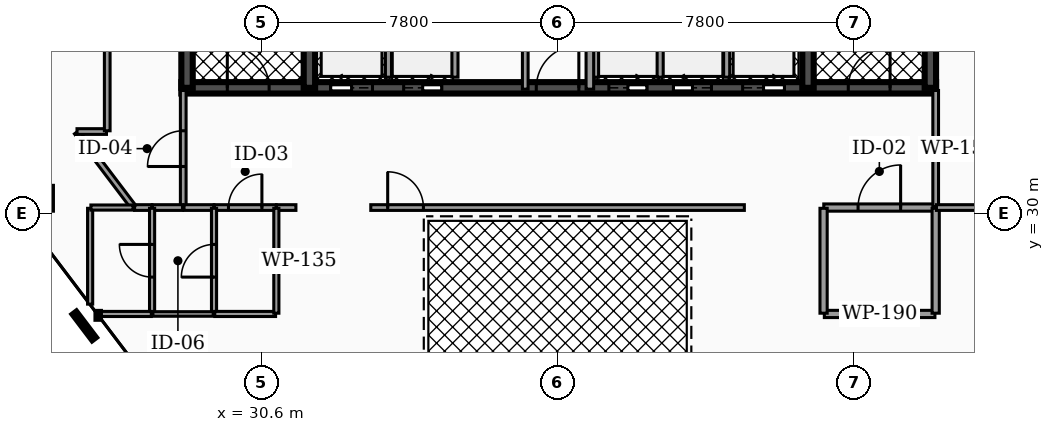
"""IFC4 building model, lengths in metres.
Left out: names, types, materials, properties, quantities, classifications, styles, units other than length and angle.
Written with IfcOpenShell. Run it as: python <this file> out.ifc"""

import sys

from ifc_helpers import new_model, si_unit, direction, frame, frame_2d, origin, place, context, subcontext, project, spatial, rectangle, extrude, element, fill, save


model = new_model("IFC4")
c1 = context("Model", 3, precision=1e-05, world=origin(), true_north=direction((0.0, 1.0)))
c2 = subcontext(c1, "Body", "Model", "MODEL_VIEW")
j1 = project(units=[si_unit("LENGTHUNIT", "METRE"), si_unit("PLANEANGLEUNIT", "RADIAN")], contexts=[c1])
p1 = place(None, origin())
s1 = spatial("IfcSite", under=j1, at=p1, CompositionType="ELEMENT")
p2 = place(p1, origin())
s2 = spatial("IfcBuilding", under=s1, at=p2, CompositionType="ELEMENT")
p3 = place(p2, frame((0.0, 0.0, 239.36)))
s3 = spatial("IfcBuildingStorey", under=s2, at=p3, CompositionType="ELEMENT", Elevation=239.36)
p4 = place(p3, frame((28.5, 33.3, 0.0), z_axis=(0.0, 0.0, 1.0), x_axis=(1.0, 0.0, 0.0)))
e1 = element("IfcWall", 1, at=p4, inside=s3, PredefinedType="SHEAR", context=c2, shape_type="SweptSolid", body=[
    extrude(rectangle(XDim=19.86, YDim=0.3, at=frame_2d((9.93, 0.0))), origin(), (0.0, 0.0, 1.0), 3.18),
])
p5 = place(p4, frame((3.93, 0.0, 0.0)))
e2 = element("IfcOpeningElement", 2, at=p5, cuts=e1, PredefinedType="OPENING", context=c2, shape_type="SweptSolid", body=[
    extrude(rectangle(XDim=1.1, YDim=2.15, at=frame_2d((0.55, 1.075))), frame((0.0, 0.16, 0.0), z_axis=(0.0, -1.0, 0.0), x_axis=(1.0, 0.0, 0.0)), (0.0, 0.0, 1.0), 0.32),
])
p6 = place(p4, frame((14.77, 0.0, 0.0)))
e3 = element("IfcOpeningElement", 3, at=p6, cuts=e1, PredefinedType="OPENING", context=c2, shape_type="SweptSolid", body=[
    extrude(rectangle(XDim=1.1, YDim=2.15, at=frame_2d((0.55, 1.075))), frame((0.0, 0.16, 0.0), z_axis=(0.0, -1.0, 0.0), x_axis=(1.0, 0.0, 0.0)), (0.0, 0.0, 1.0), 0.32),
])
p7 = place(p4, frame((11.25, 0.0, 0.0)))
e4 = element("IfcOpeningElement", 4, at=p7, cuts=e1, PredefinedType="OPENING", context=c2, shape_type="SweptSolid", body=[
    extrude(rectangle(XDim=1.0, YDim=2.1, at=frame_2d((0.5, 1.05))), frame((0.0, 0.16, 0.0), z_axis=(0.0, -1.0, 0.0), x_axis=(1.0, 0.0, 0.0)), (0.0, 0.0, 1.0), 0.32),
])
p8 = place(p4, frame((12.95, 0.0, 0.0)))
e5 = element("IfcOpeningElement", 5, at=p8, cuts=e1, PredefinedType="OPENING", context=c2, shape_type="SweptSolid", body=[
    extrude(rectangle(XDim=1.0, YDim=2.1, at=frame_2d((0.5, 1.05))), frame((0.0, 0.16, 0.0), z_axis=(0.0, -1.0, 0.0), x_axis=(1.0, 0.0, 0.0)), (0.0, 0.0, 1.0), 0.32),
])
p9 = place(p4, frame((5.85, 0.0, 0.0)))
e6 = element("IfcOpeningElement", 6, at=p9, cuts=e1, PredefinedType="OPENING", context=c2, shape_type="SweptSolid", body=[
    extrude(rectangle(XDim=1.0, YDim=2.1, at=frame_2d((0.5, 1.05))), frame((0.0, 0.16, 0.0), z_axis=(0.0, -1.0, 0.0), x_axis=(1.0, 0.0, 0.0)), (0.0, 0.0, 1.0), 0.32),
])
p10 = place(p4, frame((1.21, 0.0, 0.0)))
e7 = element("IfcOpeningElement", 7, at=p10, cuts=e1, PredefinedType="OPENING", context=c2, shape_type="SweptSolid", body=[
    extrude(rectangle(XDim=1.1, YDim=2.2, at=frame_2d((0.55, 1.1))), frame((0.0, 0.16, 0.0), z_axis=(0.0, -1.0, 0.0), x_axis=(1.0, 0.0, 0.0)), (0.0, 0.0, 1.0), 0.32),
])
p11 = place(p4, frame((9.34, 0.0, 0.0)))
e8 = element("IfcOpeningElement", 8, at=p11, cuts=e1, PredefinedType="OPENING", context=c2, shape_type="SweptSolid", body=[
    extrude(rectangle(XDim=1.12, YDim=2.05, at=frame_2d((0.56, 1.025))), frame((0.0, 0.16, 0.0), z_axis=(0.0, -1.0, 0.0), x_axis=(1.0, 0.0, 0.0)), (0.0, 0.0, 1.0), 0.32),
])
p12 = place(p4, frame((17.55, 0.0, 0.0)))
e9 = element("IfcOpeningElement", 9, at=p12, cuts=e1, PredefinedType="OPENING", context=c2, shape_type="SweptSolid", body=[
    extrude(rectangle(XDim=1.1, YDim=2.2, at=frame_2d((0.55, 1.1))), frame((0.0, 0.16, 0.0), z_axis=(0.0, -1.0, 0.0), x_axis=(1.0, 0.0, 0.0)), (0.0, 0.0, 1.0), 0.32),
])
for number, where, z_axis, x_axis in (
    (10, (28.65, 33.3, 0.0), (0.0, 0.0, 1.0), (0.0, 1.0, 0.0)),
    (11, (31.87, 33.3, 0.0), (0.0, 0.0, 1.0), (0.0, 1.0, 0.0)),
    (12, (44.99, 33.3, 0.0), (0.0, 0.0, 1.0), (0.0, 1.0, 0.0)),
    (13, (48.21, 33.3, 0.0), (0.0, 0.0, 1.0), (0.0, 1.0, 0.0)),
):
    element("IfcWall", number, at=place(p3, frame(where, z_axis=z_axis, x_axis=x_axis)), inside=s3, PredefinedType="SHEAR", context=c2, shape_type="SweptSolid", body=[
        extrude(rectangle(XDim=10.1, YDim=0.3, at=frame_2d((5.05, 0.0))), origin(), (0.0, 0.0, 1.0), 3.18),
    ])
for number, where, z_axis, x_axis in (
    (14, (33.95, 33.58, 0.0), (0.0, 0.0, 1.0), (0.0, 1.0, 0.0)),
    (15, (42.85, 33.58, 0.0), (0.0, 0.0, 1.0), (0.0, 1.0, 0.0)),
):
    element("IfcWall", number, at=place(p3, frame(where, z_axis=z_axis, x_axis=x_axis)), inside=s3, PredefinedType="SOLIDWALL", context=c2, shape_type="SweptSolid", body=[
        extrude(rectangle(XDim=2.45, YDim=0.16, at=frame_2d((1.225, 0.0))), origin(), (0.0, 0.0, 1.0), 3.18),
    ])
for number, where, z_axis, x_axis in (
    (16, (39.4, 33.58, 0.0), (0.0, 0.0, 1.0), (0.0, 1.0, 0.0)),
    (17, (41.1, 33.58, 0.0), (0.0, 0.0, 1.0), (0.0, 1.0, 0.0)),
    (18, (35.7, 33.58, 0.0), (0.0, 0.0, 1.0), (0.0, 1.0, 0.0)),
):
    element("IfcWall", number, at=place(p3, frame(where, z_axis=z_axis, x_axis=x_axis)), inside=s3, PredefinedType="SOLIDWALL", context=c2, shape_type="SweptSolid", body=[
        extrude(rectangle(XDim=2.25, YDim=0.16, at=frame_2d((1.125, 0.0))), origin(), (0.0, 0.0, 1.0), 3.18),
    ])
p13 = place(p3, frame((37.55, 33.265, 0.0), z_axis=(0.0, 0.0, 1.0), x_axis=(0.0, 1.0, 0.0)))
e19 = element("IfcWall", 19, at=p13, inside=s3, PredefinedType="PARTITIONING", context=c2, shape_type="SweptSolid", body=[
    extrude(rectangle(XDim=3.615, YDim=0.15, at=frame_2d((1.808, 0.0))), origin(), (0.0, 0.0, 1.0), 2.235),
])
p14 = place(p13, frame((1.337, 0.0, 0.0)))
e20 = element("IfcOpeningElement", 20, at=p14, cuts=e19, PredefinedType="OPENING", context=c2, shape_type="SweptSolid", body=[
    extrude(rectangle(XDim=0.94, YDim=2.05, at=frame_2d((0.47, 1.025))), frame((0.0, 0.085, 0.0), z_axis=(0.0, -1.0, 0.0), x_axis=(1.0, 0.0, 0.0)), (0.0, 0.0, 1.0), 0.17),
])
p15 = place(p3, frame((39.25, 33.265, 0.0), z_axis=(0.0, 0.0, 1.0), x_axis=(0.0, 1.0, 0.0)))
e21 = element("IfcWall", 21, at=p15, inside=s3, PredefinedType="PARTITIONING", context=c2, shape_type="SweptSolid", body=[
    extrude(rectangle(XDim=3.615, YDim=0.2, at=frame_2d((1.808, 0.0))), origin(), (0.0, 0.0, 1.0), 2.235),
])
p16 = place(p3, frame((45.405, 30.15, 0.0), z_axis=(0.0, 0.0, 1.0), x_axis=(1.0, 0.0, 0.0)))
e22 = element("IfcWall", 22, at=p16, inside=s3, PredefinedType="PARTITIONING", context=c2, shape_type="SweptSolid", body=[
    extrude(rectangle(XDim=2.925, YDim=0.19, at=frame_2d((1.462, 0.0))), origin(), (0.0, 0.0, 1.0), 2.235),
])
p17 = place(p16, frame((0.903, 0.0, 0.0)))
e23 = element("IfcOpeningElement", 23, at=p17, cuts=e22, PredefinedType="OPENING", context=c2, shape_type="SweptSolid", body=[
    extrude(rectangle(XDim=1.12, YDim=2.05, at=frame_2d((0.56, 1.025))), frame((0.0, 0.105, 0.0), z_axis=(0.0, -1.0, 0.0), x_axis=(1.0, 0.0, 0.0)), (0.0, 0.0, 1.0), 0.21),
])
p18 = place(p3, frame((28.55, 30.17, 0.0), z_axis=(0.0, 0.0, 1.0), x_axis=(0.0, 1.0, 0.0)))
e24 = element("IfcWall", 24, at=p18, inside=s3, PredefinedType="PARTITIONING", context=c2, shape_type="SweptSolid", body=[
    extrude(rectangle(XDim=3.06, YDim=0.15, at=frame_2d((1.53, 0.0))), origin(), (0.0, 0.0, 1.0), 2.235),
])
p19 = place(p18, frame((1.06, 0.0, 0.0)))
e25 = element("IfcOpeningElement", 25, at=p19, cuts=e24, PredefinedType="OPENING", context=c2, shape_type="SweptSolid", body=[
    extrude(rectangle(XDim=0.94, YDim=2.05, at=frame_2d((0.47, 1.025))), frame((0.0, 0.085, 0.0), z_axis=(0.0, -1.0, 0.0), x_axis=(1.0, 0.0, 0.0)), (0.0, 0.0, 1.0), 0.17),
])
p20 = place(p3, frame((48.35, 30.17, 0.0), z_axis=(0.0, 0.0, 1.0), x_axis=(0.0, 1.0, 0.0)))
e26 = element("IfcWall", 26, at=p20, inside=s3, PredefinedType="PARTITIONING", context=c2, shape_type="SweptSolid", body=[
    extrude(rectangle(XDim=3.06, YDim=0.15, at=frame_2d((1.53, 0.0))), origin(), (0.0, 0.0, 1.0), 2.235),
])
p21 = place(p3, frame((29.365, 30.15, 0.0), z_axis=(0.0, 0.0, 1.0), x_axis=(1.0, 0.0, 0.0)))
e27 = element("IfcWall", 27, at=p21, inside=s3, PredefinedType="PARTITIONING", context=c2, shape_type="SweptSolid", body=[
    extrude(rectangle(XDim=1.63, YDim=0.15, at=frame_2d((0.815, 0.0))), origin(), (0.0, 0.0, 1.0), 2.235),
])
p22 = place(p21, frame((0.375, 0.0, 0.0)))
e28 = element("IfcOpeningElement", 28, at=p22, cuts=e27, PredefinedType="OPENING", context=c2, shape_type="SweptSolid", body=[
    extrude(rectangle(XDim=0.88, YDim=2.05, at=frame_2d((0.44, 1.025))), frame((0.0, 0.085, 0.0), z_axis=(0.0, -1.0, 0.0), x_axis=(1.0, 0.0, 0.0)), (0.0, 0.0, 1.0), 0.17),
])
p23 = place(p3, frame((28.57, 30.15, 0.0), z_axis=(0.0, 0.0, 1.0), x_axis=(1.0, 0.0, 0.0)))
e29 = element("IfcWall", 29, at=p23, inside=s3, PredefinedType="PARTITIONING", context=c2, shape_type="SweptSolid", body=[
    extrude(rectangle(XDim=0.785, YDim=0.15, at=frame_2d((0.393, 0.0))), origin(), (0.0, 0.0, 1.0), 2.235),
])
p24 = place(p3, frame((33.485, 30.15, 0.0), z_axis=(0.0, 0.0, 1.0), x_axis=(1.0, 0.0, 0.0)))
e30 = element("IfcWall", 30, at=p24, inside=s3, PredefinedType="PARTITIONING", context=c2, shape_type="SweptSolid", body=[
    extrude(rectangle(XDim=9.83, YDim=0.15, at=frame_2d((4.915, 0.0))), origin(), (0.0, 0.0, 1.0), 2.235),
])
p25 = place(p24, frame((0.445, 0.0, 0.0)))
e31 = element("IfcOpeningElement", 31, at=p25, cuts=e30, PredefinedType="OPENING", context=c2, shape_type="SweptSolid", body=[
    extrude(rectangle(XDim=0.94, YDim=2.05, at=frame_2d((0.47, 1.025))), frame((0.0, 0.085, 0.0), z_axis=(0.0, -1.0, 0.0), x_axis=(1.0, 0.0, 0.0)), (0.0, 0.0, 1.0), 0.17),
])
p26 = place(p3, frame((31.005, 30.15, 0.0), z_axis=(0.0, 0.0, 1.0), x_axis=(1.0, 0.0, 0.0)))
e32 = element("IfcWall", 32, at=p26, inside=s3, PredefinedType="PARTITIONING", context=c2, shape_type="SweptSolid", body=[
    extrude(rectangle(XDim=0.51, YDim=0.15, at=frame_2d((0.255, 0.0))), origin(), (0.0, 0.0, 1.0), 2.235),
])
p27 = place(p3, frame((45.42, 27.35, 0.0), z_axis=(0.0, 0.0, 1.0), x_axis=(1.0, 0.0, 0.0)))
e33 = element("IfcWall", 33, at=p27, inside=s3, PredefinedType="PARTITIONING", context=c2, shape_type="SweptSolid", body=[
    extrude(rectangle(XDim=2.91, YDim=0.19, at=frame_2d((1.455, 0.0))), origin(), (0.0, 0.0, 1.0), 2.235),
])
for number, where, z_axis, x_axis in (
    (34, (45.4, 27.37, 0.0), (0.0, 0.0, 1.0), (0.0, 1.0, 0.0)),
    (35, (48.35, 27.37, 0.0), (0.0, 0.0, 1.0), (0.0, 1.0, 0.0)),
):
    element("IfcWall", number, at=place(p3, frame(where, z_axis=z_axis, x_axis=x_axis)), inside=s3, PredefinedType="PARTITIONING", context=c2, shape_type="SweptSolid", body=[
        extrude(rectangle(XDim=2.76, YDim=0.19, at=frame_2d((1.38, 0.0))), origin(), (0.0, 0.0, 1.0), 2.235),
    ])
p28 = place(p3, frame((27.27, 30.15, 0.0), z_axis=(0.0, 0.0, 1.0), x_axis=(1.0, 0.0, 0.0)))
e36 = element("IfcWall", 36, at=p28, inside=s3, PredefinedType="PARTITIONING", context=c2, shape_type="SweptSolid", body=[
    extrude(rectangle(XDim=0.455, YDim=0.15, at=frame_2d((0.228, 0.0))), origin(), (0.0, 0.0, 1.0), 2.235),
])
p29 = place(p3, frame((27.735, 30.15, 0.0), z_axis=(0.0, 0.0, 1.0), x_axis=(1.0, 0.0, 0.0)))
e37 = element("IfcWall", 37, at=p29, inside=s3, PredefinedType="PARTITIONING", context=c2, shape_type="SweptSolid", body=[
    extrude(rectangle(XDim=0.795, YDim=0.15, at=frame_2d((0.397, 0.0))), origin(), (0.0, 0.0, 1.0), 2.235),
])
p30 = place(p3, frame((48.37, 30.15, 0.0), z_axis=(0.0, 0.0, 1.0), x_axis=(1.0, 0.0, 0.0)))
e38 = element("IfcWall", 38, at=p30, inside=s3, PredefinedType="PARTITIONING", context=c2, shape_type="SweptSolid", body=[
    extrude(rectangle(XDim=1.16, YDim=0.15, at=frame_2d((0.58, 0.0))), origin(), (0.0, 0.0, 1.0), 2.235),
])
p31 = place(p3, frame((25.747, 32.134, 0.0), z_axis=(0.0, 0.0, 1.0), x_axis=(0.603931928578, -0.797035899847, 0.0)))
e39 = element("IfcWall", 39, at=p31, inside=s3, PredefinedType="PARTITIONING", context=c2, shape_type="SweptSolid", body=[
    extrude(rectangle(XDim=2.469, YDim=0.15, at=frame_2d((1.235, 0.0))), origin(), (0.0, 0.0, 1.0), 2.235),
])
p32 = place(p3, frame((25.755, 32.15, 0.0), z_axis=(0.0, 0.0, 1.0), x_axis=(1.0, 0.0, 0.0)))
e40 = element("IfcWall", 40, at=p32, inside=s3, PredefinedType="PARTITIONING", context=c2, shape_type="SweptSolid", body=[
    extrude(rectangle(XDim=0.775, YDim=0.15, at=frame_2d((0.388, 0.0))), origin(), (0.0, 0.0, 1.0), 2.235),
])
p33 = place(p3, frame((26.55, 32.17, 0.0), z_axis=(0.0, 0.0, 1.0), x_axis=(0.0, 1.0, 0.0)))
e41 = element("IfcWall", 41, at=p33, inside=s3, PredefinedType="PARTITIONING", context=c2, shape_type="SweptSolid", body=[
    extrude(rectangle(XDim=11.38, YDim=0.15, at=frame_2d((5.69, 0.0))), origin(), (0.0, 0.0, 1.0), 2.235),
])
p34 = place(p33, frame((5.22, 0.0, 0.0)))
e42 = element("IfcOpeningElement", 42, at=p34, cuts=e41, PredefinedType="OPENING", context=c2, shape_type="SweptSolid", body=[
    extrude(rectangle(XDim=0.94, YDim=2.05, at=frame_2d((0.47, 1.025))), frame((0.0, 0.085, 0.0), z_axis=(0.0, -1.0, 0.0), x_axis=(1.0, 0.0, 0.0)), (0.0, 0.0, 1.0), 0.17),
])
p35 = place(p3, frame((29.36, 27.37, 0.0), z_axis=(0.0, 0.0, 1.0), x_axis=(0.0, 1.0, 0.0)))
e43 = element("IfcWall", 43, at=p35, inside=s3, PredefinedType="PARTITIONING", context=c2, shape_type="SweptSolid", body=[
    extrude(rectangle(XDim=2.76, YDim=0.135, at=frame_2d((1.38, 0.0))), origin(), (0.0, 0.0, 1.0), 2.235),
])
p36 = place(p35, frame((0.95, 0.0, 0.0)))
e44 = element("IfcOpeningElement", 44, at=p36, cuts=e43, PredefinedType="OPENING", context=c2, shape_type="SweptSolid", body=[
    extrude(rectangle(XDim=0.86, YDim=2.05, at=frame_2d((0.43, 1.025))), frame((0.0, 0.077, 0.0), z_axis=(0.0, -1.0, 0.0), x_axis=(1.0, 0.0, 0.0)), (0.0, 0.0, 1.0), 0.155),
])
p37 = place(p3, frame((29.38, 27.35, 0.0), z_axis=(0.0, 0.0, 1.0), x_axis=(1.0, 0.0, 0.0)))
e45 = element("IfcWall", 45, at=p37, inside=s3, PredefinedType="PARTITIONING", context=c2, shape_type="SweptSolid", body=[
    extrude(rectangle(XDim=1.6, YDim=0.135, at=frame_2d((0.8, 0.0))), origin(), (0.0, 0.0, 1.0), 2.235),
])
p38 = place(p3, frame((31.0, 27.37, 0.0), z_axis=(0.0, 0.0, 1.0), x_axis=(0.0, 1.0, 0.0)))
e46 = element("IfcWall", 46, at=p38, inside=s3, PredefinedType="PARTITIONING", context=c2, shape_type="SweptSolid", body=[
    extrude(rectangle(XDim=2.76, YDim=0.135, at=frame_2d((1.38, 0.0))), origin(), (0.0, 0.0, 1.0), 2.235),
])
p39 = place(p3, frame((27.73, 27.37, 0.0), z_axis=(0.0, 0.0, 1.0), x_axis=(0.0, 1.0, 0.0)))
e47 = element("IfcWall", 47, at=p39, inside=s3, PredefinedType="PARTITIONING", context=c2, shape_type="SweptSolid", body=[
    extrude(rectangle(XDim=2.76, YDim=0.135, at=frame_2d((1.38, 0.0))), origin(), (0.0, 0.0, 1.0), 2.235),
])
p40 = place(p39, frame((0.95, 0.0, 0.0)))
e48 = element("IfcOpeningElement", 48, at=p40, cuts=e47, PredefinedType="OPENING", context=c2, shape_type="SweptSolid", body=[
    extrude(rectangle(XDim=0.86, YDim=2.05, at=frame_2d((0.43, 1.025))), frame((0.0, 0.077, 0.0), z_axis=(0.0, -1.0, 0.0), x_axis=(1.0, 0.0, 0.0)), (0.0, 0.0, 1.0), 0.155),
])
p41 = place(p3, frame((26.3, 27.35, 0.0), z_axis=(0.0, 0.0, 1.0), x_axis=(1.0, 0.0, 0.0)))
e49 = element("IfcWall", 49, at=p41, inside=s3, PredefinedType="PARTITIONING", context=c2, shape_type="SweptSolid", body=[
    extrude(rectangle(XDim=1.41, YDim=0.135, at=frame_2d((0.705, 0.0))), origin(), (0.0, 0.0, 1.0), 2.235),
])
p42 = place(p3, frame((26.1, 27.609, 0.0), z_axis=(0.0, 0.0, 1.0), x_axis=(0.0, 1.0, 0.0)))
e50 = element("IfcWall", 50, at=p42, inside=s3, PredefinedType="PARTITIONING", context=c2, shape_type="SweptSolid", body=[
    extrude(rectangle(XDim=2.521, YDim=0.135, at=frame_2d((1.26, 0.0))), origin(), (0.0, 0.0, 1.0), 2.235),
])
p43 = place(p3, frame((26.12, 30.15, 0.0), z_axis=(0.0, 0.0, 1.0), x_axis=(1.0, 0.0, 0.0)))
e51 = element("IfcWall", 51, at=p43, inside=s3, PredefinedType="PARTITIONING", context=c2, shape_type="SweptSolid", body=[
    extrude(rectangle(XDim=1.11, YDim=0.135, at=frame_2d((0.555, 0.0))), origin(), (0.0, 0.0, 1.0), 2.235),
])
p44 = place(p3, frame((27.75, 27.35, 0.0), z_axis=(0.0, 0.0, 1.0), x_axis=(1.0, 0.0, 0.0)))
e52 = element("IfcWall", 52, at=p44, inside=s3, PredefinedType="PARTITIONING", context=c2, shape_type="SweptSolid", body=[
    extrude(rectangle(XDim=1.59, YDim=0.12, at=frame_2d((0.795, 0.0))), origin(), (0.0, 0.0, 1.0), 2.235),
])
p45 = place(p5, origin())
e53 = element("IfcDoor", 53, at=p45, inside=s3, OperationType="SLIDING_TO_LEFT", PredefinedType="DOOR", context=c2, shape_type="SweptSolid", body=[
    extrude(rectangle(XDim=1.1, YDim=2.15, at=frame_2d((0.55, 1.075))), frame((0.0, 0.025, 0.0), z_axis=(0.0, -1.0, 0.0), x_axis=(1.0, 0.0, 0.0)), (0.0, 0.0, 1.0), 0.05),
])
fill(e2, e53)
p46 = place(p6, origin())
e54 = element("IfcDoor", 54, at=p46, inside=s3, OperationType="SLIDING_TO_RIGHT", PredefinedType="DOOR", context=c2, shape_type="SweptSolid", body=[
    extrude(rectangle(XDim=1.1, YDim=2.15, at=frame_2d((0.55, 1.075))), frame((0.0, 0.025, 0.0), z_axis=(0.0, -1.0, 0.0), x_axis=(1.0, 0.0, 0.0)), (0.0, 0.0, 1.0), 0.05),
])
fill(e3, e54)
p47 = place(p7, origin())
e55 = element("IfcDoor", 55, at=p47, inside=s3, OperationType="SLIDING_TO_RIGHT", PredefinedType="DOOR", context=c2, shape_type="SweptSolid", body=[
    extrude(rectangle(XDim=1.0, YDim=2.1, at=frame_2d((0.5, 1.05))), frame((0.0, 0.025, 0.0), z_axis=(0.0, -1.0, 0.0), x_axis=(1.0, 0.0, 0.0)), (0.0, 0.0, 1.0), 0.05),
])
fill(e4, e55)
p48 = place(p8, origin())
e56 = element("IfcDoor", 56, at=p48, inside=s3, OperationType="SLIDING_TO_LEFT", PredefinedType="DOOR", context=c2, shape_type="SweptSolid", body=[
    extrude(rectangle(XDim=1.0, YDim=2.1, at=frame_2d((0.5, 1.05))), frame((0.0, 0.025, 0.0), z_axis=(0.0, -1.0, 0.0), x_axis=(1.0, 0.0, 0.0)), (0.0, 0.0, 1.0), 0.05),
])
fill(e5, e56)
p49 = place(p9, origin())
e57 = element("IfcDoor", 57, at=p49, inside=s3, OperationType="SLIDING_TO_RIGHT", PredefinedType="DOOR", context=c2, shape_type="SweptSolid", body=[
    extrude(rectangle(XDim=1.0, YDim=2.1, at=frame_2d((0.5, 1.05))), frame((0.0, 0.025, 0.0), z_axis=(0.0, -1.0, 0.0), x_axis=(1.0, 0.0, 0.0)), (0.0, 0.0, 1.0), 0.05),
])
fill(e6, e57)
p50 = place(p10, origin())
e58 = element("IfcDoor", 58, at=p50, inside=s3, OperationType="SINGLE_SWING_LEFT", PredefinedType="DOOR", context=c2, shape_type="SweptSolid", body=[
    extrude(rectangle(XDim=1.1, YDim=2.2, at=frame_2d((0.55, 1.1))), frame((0.0, 0.025, 0.0), z_axis=(0.0, -1.0, 0.0), x_axis=(1.0, 0.0, 0.0)), (0.0, 0.0, 1.0), 0.05),
])
fill(e7, e58)
p51 = place(p11, origin())
e59 = element("IfcDoor", 59, at=p51, inside=s3, OperationType="SINGLE_SWING_RIGHT", PredefinedType="DOOR", context=c2, shape_type="SweptSolid", body=[
    extrude(rectangle(XDim=1.12, YDim=2.05, at=frame_2d((0.56, 1.025))), frame((0.0, 0.025, 0.0), z_axis=(0.0, -1.0, 0.0), x_axis=(1.0, 0.0, 0.0)), (0.0, 0.0, 1.0), 0.05),
])
fill(e8, e59)
p52 = place(p12, origin())
e60 = element("IfcDoor", 60, at=p52, inside=s3, OperationType="SINGLE_SWING_RIGHT", PredefinedType="DOOR", context=c2, shape_type="SweptSolid", body=[
    extrude(rectangle(XDim=1.1, YDim=2.2, at=frame_2d((0.55, 1.1))), frame((0.0, 0.025, 0.0), z_axis=(0.0, -1.0, 0.0), x_axis=(1.0, 0.0, 0.0)), (0.0, 0.0, 1.0), 0.05),
])
fill(e9, e60)
p53 = place(p17, origin())
e61 = element("IfcDoor", 61, at=p53, inside=s3, OperationType="SINGLE_SWING_RIGHT", PredefinedType="DOOR", context=c2, shape_type="SweptSolid", body=[
    extrude(rectangle(XDim=1.12, YDim=2.05, at=frame_2d((0.56, 1.025))), frame((0.0, 0.025, 0.0), z_axis=(0.0, -1.0, 0.0), x_axis=(1.0, 0.0, 0.0)), (0.0, 0.0, 1.0), 0.05),
])
fill(e23, e61)
p54 = place(p19, origin())
e62 = element("IfcDoor", 62, at=p54, inside=s3, OperationType="SINGLE_SWING_LEFT", PredefinedType="DOOR", context=c2, shape_type="SweptSolid", body=[
    extrude(rectangle(XDim=0.94, YDim=2.05, at=frame_2d((0.47, 1.025))), frame((0.0, 0.025, 0.0), z_axis=(0.0, -1.0, 0.0), x_axis=(1.0, 0.0, 0.0)), (0.0, 0.0, 1.0), 0.05),
])
fill(e25, e62)
p55 = place(p22, origin())
e63 = element("IfcDoor", 63, at=p55, inside=s3, OperationType="SINGLE_SWING_RIGHT", PredefinedType="DOOR", context=c2, shape_type="SweptSolid", body=[
    extrude(rectangle(XDim=0.88, YDim=2.05, at=frame_2d((0.44, 1.025))), frame((0.0, 0.025, 0.0), z_axis=(0.0, -1.0, 0.0), x_axis=(1.0, 0.0, 0.0)), (0.0, 0.0, 1.0), 0.05),
])
fill(e28, e63)
p56 = place(p25, origin())
e64 = element("IfcDoor", 64, at=p56, inside=s3, OperationType="SINGLE_SWING_LEFT", PredefinedType="DOOR", context=c2, shape_type="SweptSolid", body=[
    extrude(rectangle(XDim=0.94, YDim=2.05, at=frame_2d((0.47, 1.025))), frame((0.0, 0.025, 0.0), z_axis=(0.0, -1.0, 0.0), x_axis=(1.0, 0.0, 0.0)), (0.0, 0.0, 1.0), 0.05),
])
fill(e31, e64)
p57 = place(p36, origin())
e65 = element("IfcDoor", 65, at=p57, inside=s3, OperationType="SINGLE_SWING_LEFT", PredefinedType="DOOR", context=c2, shape_type="SweptSolid", body=[
    extrude(rectangle(XDim=0.86, YDim=2.05, at=frame_2d((0.43, 1.025))), frame((0.0, 0.025, 0.0), z_axis=(0.0, -1.0, 0.0), x_axis=(1.0, 0.0, 0.0)), (0.0, 0.0, 1.0), 0.05),
])
fill(e44, e65)
p58 = place(p40, origin())
e66 = element("IfcDoor", 66, at=p58, inside=s3, OperationType="SINGLE_SWING_RIGHT", PredefinedType="DOOR", context=c2, shape_type="SweptSolid", body=[
    extrude(rectangle(XDim=0.86, YDim=2.05, at=frame_2d((0.43, 1.025))), frame((0.0, 0.025, 0.0), z_axis=(0.0, -1.0, 0.0), x_axis=(1.0, 0.0, 0.0)), (0.0, 0.0, 1.0), 0.05),
])
fill(e48, e66)
save(model, sys.argv[1])
